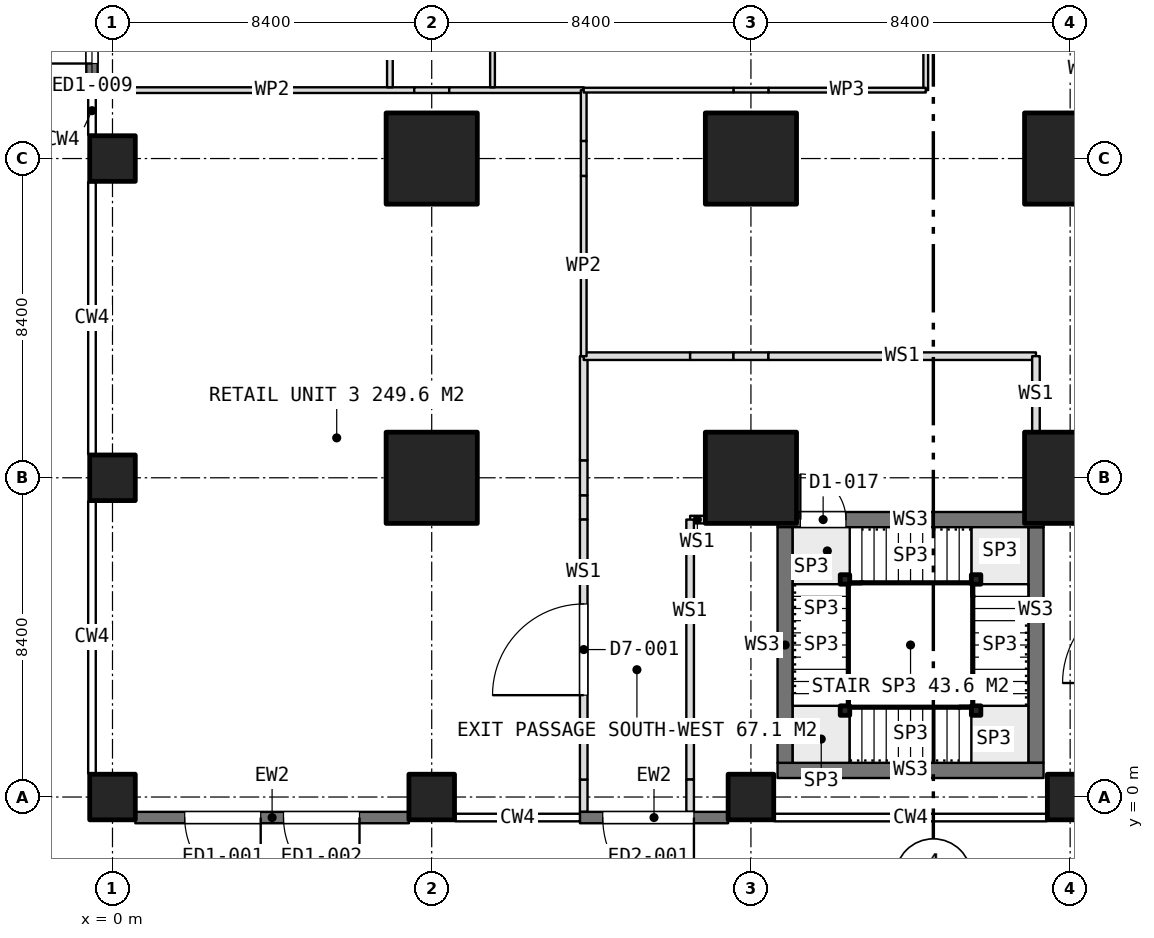
"""IFC4 building model, lengths in metres.
Left out: names, types, materials, properties, quantities, classifications, styles, units other than length and angle.
Written with IfcOpenShell. Run it as: python <this file> out.ifc"""

import sys

from ifc_helpers import new_model, si_unit, direction, frame, frame_2d, origin, origin_2d, place, context, subcontext, project, spatial, rectangle, extrude, element, fill, save


model = new_model("IFC4")
c1 = context("Model", 3, precision=1e-05, world=origin(), true_north=direction((0.0, 1.0)))
c2 = subcontext(c1, "Body", "Model", "MODEL_VIEW")
j1 = project(units=[si_unit("LENGTHUNIT", "METRE"), si_unit("PLANEANGLEUNIT", "RADIAN")], contexts=[c1])
p1 = place(None, origin())
s1 = spatial("IfcSite", under=j1, at=p1, CompositionType="ELEMENT")
p2 = place(p1, origin())
s2 = spatial("IfcBuilding", under=s1, at=p2, CompositionType="ELEMENT")
p3 = place(p2, origin())
s3 = spatial("IfcBuildingStorey", under=s2, at=p3, CompositionType="ELEMENT", Elevation=0.0)
for number, where, z_axis, x_axis in (
    (1, (0.0, 0.0, 0.0), (0.0, 0.0, 1.0), (1.0, 0.0, 0.0)),
    (2, (0.0, 8.4, 0.0), (0.0, 0.0, 1.0), (1.0, 0.0, 0.0)),
    (3, (0.0, 16.8, 0.0), (0.0, 0.0, 1.0), (1.0, 0.0, 0.0)),
    (4, (8.4, 0.0, 0.0), (0.0, 0.0, 1.0), (1.0, 0.0, 0.0)),
):
    element("IfcColumn", number, at=place(p3, frame(where, z_axis=z_axis, x_axis=x_axis)), inside=s3, PredefinedType="COLUMN", context=c2, shape_type="SweptSolid", body=[
        extrude(rectangle(XDim=1.2, YDim=1.2, at=origin_2d()), origin(), (0.0, 0.0, 1.0), 5.4),
    ])
for number, where, z_axis, x_axis in (
    (5, (8.4, 8.4, 0.0), (0.0, 0.0, 1.0), (1.0, 0.0, 0.0)),
    (6, (8.4, 16.8, 0.0), (0.0, 0.0, 1.0), (1.0, 0.0, 0.0)),
):
    element("IfcColumn", number, at=place(p3, frame(where, z_axis=z_axis, x_axis=x_axis)), inside=s3, PredefinedType="COLUMN", context=c2, shape_type="SweptSolid", body=[
        extrude(rectangle(XDim=2.4, YDim=2.4, at=origin_2d()), origin(), (0.0, 0.0, 1.0), 5.4),
    ])
p4 = place(p3, frame((16.8, 0.0, 0.0), z_axis=(0.0, 0.0, 1.0), x_axis=(1.0, 0.0, 0.0)))
e7 = element("IfcColumn", 7, at=p4, inside=s3, PredefinedType="COLUMN", context=c2, shape_type="SweptSolid", body=[
    extrude(rectangle(XDim=1.2, YDim=1.2, at=origin_2d()), origin(), (0.0, 0.0, 1.0), 5.4),
])
for number, where, z_axis, x_axis in (
    (8, (16.8, 8.4, 0.0), (0.0, 0.0, 1.0), (1.0, 0.0, 0.0)),
    (9, (16.8, 16.8, 0.0), (0.0, 0.0, 1.0), (1.0, 0.0, 0.0)),
):
    element("IfcColumn", number, at=place(p3, frame(where, z_axis=z_axis, x_axis=x_axis)), inside=s3, PredefinedType="COLUMN", context=c2, shape_type="SweptSolid", body=[
        extrude(rectangle(XDim=2.4, YDim=2.4, at=origin_2d()), origin(), (0.0, 0.0, 1.0), 5.4),
    ])
p5 = place(p3, frame((25.2, 0.0, 0.0), z_axis=(0.0, 0.0, 1.0), x_axis=(1.0, 0.0, 0.0)))
e10 = element("IfcColumn", 10, at=p5, inside=s3, PredefinedType="COLUMN", context=c2, shape_type="SweptSolid", body=[
    extrude(rectangle(XDim=1.2, YDim=1.2, at=origin_2d()), origin(), (0.0, 0.0, 1.0), 5.4),
])
for number, where, z_axis, x_axis in (
    (11, (25.2, 8.4, 0.0), (0.0, 0.0, 1.0), (1.0, 0.0, 0.0)),
    (12, (25.2, 16.8, 0.0), (0.0, 0.0, 1.0), (1.0, 0.0, 0.0)),
):
    element("IfcColumn", number, at=place(p3, frame(where, z_axis=z_axis, x_axis=x_axis)), inside=s3, PredefinedType="COLUMN", context=c2, shape_type="SweptSolid", body=[
        extrude(rectangle(XDim=2.4, YDim=2.4, at=origin_2d()), origin(), (0.0, 0.0, 1.0), 5.4),
    ])
p6 = place(p3, frame((7.799, -0.54, 0.0), z_axis=(0.0, 0.0, 1.0), x_axis=(-1.0, 0.0, 0.0)))
e13 = element("IfcWall", 13, at=p6, inside=s3, PredefinedType="SOLIDWALL", context=c2, shape_type="SweptSolid", body=[
    extrude(rectangle(XDim=7.198, YDim=0.3, at=frame_2d((3.599, 0.0))), origin(), (0.0, 0.0, 1.0), 3.3),
])
p7 = place(p6, frame((3.899, 0.0, 0.0)))
e14 = element("IfcOpeningElement", 14, at=p7, cuts=e13, PredefinedType="OPENING", context=c2, shape_type="SweptSolid", body=[
    extrude(rectangle(XDim=2.0, YDim=2.7, at=frame_2d((1.0, 1.35))), frame((0.0, 0.16, 0.0), z_axis=(0.0, -1.0, 0.0), x_axis=(1.0, 0.0, 0.0)), (0.0, 0.0, 1.0), 0.32),
])
p8 = place(p6, frame((1.299, 0.0, 0.0)))
e15 = element("IfcOpeningElement", 15, at=p8, cuts=e13, PredefinedType="OPENING", context=c2, shape_type="SweptSolid", body=[
    extrude(rectangle(XDim=2.0, YDim=2.7, at=frame_2d((1.0, 1.35))), frame((0.0, 0.16, 0.0), z_axis=(0.0, -1.0, 0.0), x_axis=(1.0, 0.0, 0.0)), (0.0, 0.0, 1.0), 0.32),
])
p9 = place(p3, frame((16.199, -0.54, 0.0), z_axis=(0.0, 0.0, 1.0), x_axis=(-1.0, 0.0, 0.0)))
e16 = element("IfcWall", 16, at=p9, inside=s3, PredefinedType="SOLIDWALL", context=c2, shape_type="SweptSolid", body=[
    extrude(rectangle(XDim=3.899, YDim=0.3, at=frame_2d((1.949, 0.0))), origin(), (0.0, 0.0, 1.0), 3.3),
])
p10 = place(p9, frame((0.899, 0.0, 0.0)))
e17 = element("IfcOpeningElement", 17, at=p10, cuts=e16, PredefinedType="OPENING", context=c2, shape_type="SweptSolid", body=[
    extrude(rectangle(XDim=2.4, YDim=2.4, at=frame_2d((1.2, 1.2))), frame((0.0, 0.16, 0.0), z_axis=(0.0, -1.0, 0.0), x_axis=(1.0, 0.0, 0.0)), (0.0, 0.0, 1.0), 0.32),
])
p11 = place(p3, frame((-0.54, 18.7, 0.0), z_axis=(0.0, 0.0, 1.0), x_axis=(0.0, 1.0, 0.0)))
e18 = element("IfcWall", 18, at=p11, inside=s3, PredefinedType="SOLIDWALL", context=c2, shape_type="SweptSolid", body=[
    extrude(rectangle(XDim=5.899, YDim=0.3, at=frame_2d((2.95, 0.0))), origin(), (0.0, 0.0, 1.0), 3.3),
])
p12 = place(p11, frame((3.2, 0.0, 0.0)))
e19 = element("IfcOpeningElement", 19, at=p12, cuts=e18, PredefinedType="OPENING", context=c2, shape_type="SweptSolid", body=[
    extrude(rectangle(XDim=2.0, YDim=2.7, at=frame_2d((1.0, 1.35))), frame((0.0, 0.16, 0.0), z_axis=(0.0, -1.0, 0.0), x_axis=(1.0, 0.0, 0.0)), (0.0, 0.0, 1.0), 0.32),
])
p13 = place(p11, frame((0.6, 0.0, 0.0)))
e20 = element("IfcOpeningElement", 20, at=p13, cuts=e18, PredefinedType="OPENING", context=c2, shape_type="SweptSolid", body=[
    extrude(rectangle(XDim=2.0, YDim=2.7, at=frame_2d((1.0, 1.35))), frame((0.0, 0.16, 0.0), z_axis=(0.0, -1.0, 0.0), x_axis=(1.0, 0.0, 0.0)), (0.0, 0.0, 1.0), 0.32),
])
p14 = place(p3, frame((17.5, 0.7, 0.0), z_axis=(0.0, 0.0, 1.0), x_axis=(1.0, 0.0, 0.0)))
e21 = element("IfcWall", 21, at=p14, inside=s3, PredefinedType="SOLIDWALL", context=c2, shape_type="SweptSolid", body=[
    extrude(rectangle(XDim=7.0, YDim=0.4, at=frame_2d((3.5, 0.0))), origin(), (0.0, 0.0, 1.0), 5.1),
])
p15 = place(p3, frame((17.5, 7.3, 0.0), z_axis=(0.0, 0.0, 1.0), x_axis=(1.0, 0.0, 0.0)))
e22 = element("IfcWall", 22, at=p15, inside=s3, PredefinedType="SOLIDWALL", context=c2, shape_type="SweptSolid", body=[
    extrude(rectangle(XDim=7.0, YDim=0.4, at=frame_2d((3.5, 0.0))), origin(), (0.0, 0.0, 1.0), 5.1),
])
p16 = place(p15, frame((0.6, 0.0, 0.0)))
e23 = element("IfcOpeningElement", 23, at=p16, cuts=e22, PredefinedType="OPENING", context=c2, shape_type="SweptSolid", body=[
    extrude(rectangle(XDim=1.2, YDim=2.1, at=frame_2d((0.6, 1.05))), frame((0.0, 0.21, 0.0), z_axis=(0.0, -1.0, 0.0), x_axis=(1.0, 0.0, 0.0)), (0.0, 0.0, 1.0), 0.42),
])
for number, where, z_axis, x_axis in (
    (24, (17.7, 0.9, 0.0), (0.0, 0.0, 1.0), (0.0, 1.0, 0.0)),
    (25, (24.3, 0.9, 0.0), (0.0, 0.0, 1.0), (0.0, 1.0, 0.0)),
):
    element("IfcWall", number, at=place(p3, frame(where, z_axis=z_axis, x_axis=x_axis)), inside=s3, PredefinedType="SOLIDWALL", context=c2, shape_type="SweptSolid", body=[
        extrude(rectangle(XDim=6.2, YDim=0.4, at=frame_2d((3.1, 0.0))), origin(), (0.0, 0.0, 1.0), 5.1),
    ])
p17 = place(p3, frame((12.4, 7.3, 0.0), z_axis=(0.0, 0.0, 1.0), x_axis=(0.0, 1.0, 0.0)))
e26 = element("IfcWall", 26, at=p17, inside=s3, PredefinedType="PARTITIONING", context=c2, shape_type="SweptSolid", body=[
    extrude(rectangle(XDim=0.64, YDim=0.2, at=frame_2d((0.32, 0.0))), origin(), (0.0, 0.0, 1.0), 5.1),
])
p18 = place(p3, frame((12.4, 7.94, 0.0), z_axis=(0.0, 0.0, 1.0), x_axis=(0.0, 1.0, 0.0)))
e27 = element("IfcWall", 27, at=p18, inside=s3, PredefinedType="PARTITIONING", context=c2, shape_type="SweptSolid", body=[
    extrude(rectangle(XDim=0.92, YDim=0.2, at=frame_2d((0.46, 0.0))), origin(), (0.0, 0.0, 1.0), 3.3),
])
p19 = place(p3, frame((12.4, 8.86, 0.0), z_axis=(0.0, 0.0, 1.0), x_axis=(0.0, 1.0, 0.0)))
e28 = element("IfcWall", 28, at=p19, inside=s3, PredefinedType="PARTITIONING", context=c2, shape_type="SweptSolid", body=[
    extrude(rectangle(XDim=2.74, YDim=0.2, at=frame_2d((1.37, 0.0))), origin(), (0.0, 0.0, 1.0), 5.1),
])
p20 = place(p3, frame((12.4, 11.6, 0.0), z_axis=(0.0, 0.0, 1.0), x_axis=(1.0, 0.0, 0.0)))
e29 = element("IfcWall", 29, at=p20, inside=s3, PredefinedType="PARTITIONING", context=c2, shape_type="SweptSolid", body=[
    extrude(rectangle(XDim=2.8, YDim=0.2, at=frame_2d((1.4, 0.0))), origin(), (0.0, 0.0, 1.0), 5.1),
])
p21 = place(p3, frame((15.2, 11.6, 0.0), z_axis=(0.0, 0.0, 1.0), x_axis=(1.0, 0.0, 0.0)))
e30 = element("IfcWall", 30, at=p21, inside=s3, PredefinedType="PARTITIONING", context=c2, shape_type="SweptSolid", body=[
    extrude(rectangle(XDim=1.14, YDim=0.2, at=frame_2d((0.57, 0.0))), origin(), (0.0, 0.0, 1.0), 5.1),
])
p22 = place(p3, frame((16.34, 11.6, 0.0), z_axis=(0.0, 0.0, 1.0), x_axis=(1.0, 0.0, 0.0)))
e31 = element("IfcWall", 31, at=p22, inside=s3, PredefinedType="PARTITIONING", context=c2, shape_type="SweptSolid", body=[
    extrude(rectangle(XDim=0.92, YDim=0.2, at=frame_2d((0.46, 0.0))), origin(), (0.0, 0.0, 1.0), 3.3),
])
p23 = place(p3, frame((17.26, 11.6, 0.0), z_axis=(0.0, 0.0, 1.0), x_axis=(1.0, 0.0, 0.0)))
e32 = element("IfcWall", 32, at=p23, inside=s3, PredefinedType="PARTITIONING", context=c2, shape_type="SweptSolid", body=[
    extrude(rectangle(XDim=7.04, YDim=0.2, at=frame_2d((3.52, 0.0))), origin(), (0.0, 0.0, 1.0), 5.1),
])
p24 = place(p3, frame((24.3, 11.6, 0.0), z_axis=(0.0, 0.0, 1.0), x_axis=(0.0, -1.0, 0.0)))
e33 = element("IfcWall", 33, at=p24, inside=s3, PredefinedType="PARTITIONING", context=c2, shape_type="SweptSolid", body=[
    extrude(rectangle(XDim=1.98, YDim=0.2, at=frame_2d((0.99, 0.0))), origin(), (0.0, 0.0, 1.0), 5.1),
])
p25 = place(p3, frame((15.58, 7.3, 0.0), z_axis=(0.0, 0.0, 1.0), x_axis=(-1.0, 0.0, 0.0)))
e34 = element("IfcWall", 34, at=p25, inside=s3, PredefinedType="PARTITIONING", context=c2, shape_type="SweptSolid", body=[
    extrude(rectangle(XDim=0.38, YDim=0.2, at=frame_2d((0.19, 0.0))), origin(), (0.0, 0.0, 1.0), 5.1),
])
p26 = place(p3, frame((15.2, 7.3, 0.0), z_axis=(0.0, 0.0, 1.0), x_axis=(0.0, -1.0, 0.0)))
e35 = element("IfcWall", 35, at=p26, inside=s3, PredefinedType="PARTITIONING", context=c2, shape_type="SweptSolid", body=[
    extrude(rectangle(XDim=6.84, YDim=0.2, at=frame_2d((3.42, 0.0))), origin(), (0.0, 0.0, 1.0), 5.1),
])
for number, where, z_axis, x_axis in (
    (36, (15.2, 0.46, 0.0), (0.0, 0.0, 1.0), (0.0, -1.0, 0.0)),
    (37, (12.4, -0.39, 0.0), (0.0, 0.0, 1.0), (0.0, 1.0, 0.0)),
):
    element("IfcWall", number, at=place(p3, frame(where, z_axis=z_axis, x_axis=x_axis)), inside=s3, PredefinedType="PARTITIONING", context=c2, shape_type="SweptSolid", body=[
        extrude(rectangle(XDim=0.85, YDim=0.2, at=frame_2d((0.425, 0.0))), origin(), (0.0, 0.0, 1.0), 3.3),
    ])
p27 = place(p3, frame((12.4, 0.46, 0.0), z_axis=(0.0, 0.0, 1.0), x_axis=(0.0, 1.0, 0.0)))
e38 = element("IfcWall", 38, at=p27, inside=s3, PredefinedType="PARTITIONING", context=c2, shape_type="SweptSolid", body=[
    extrude(rectangle(XDim=6.84, YDim=0.2, at=frame_2d((3.42, 0.0))), origin(), (0.0, 0.0, 1.0), 5.1),
])
p28 = place(p27, frame((2.22, 0.0, 0.0)))
e39 = element("IfcOpeningElement", 39, at=p28, cuts=e38, PredefinedType="OPENING", context=c2, shape_type="SweptSolid", body=[
    extrude(rectangle(XDim=2.4, YDim=2.4, at=frame_2d((1.2, 1.2))), frame((0.0, 0.11, 0.0), z_axis=(0.0, -1.0, 0.0), x_axis=(1.0, 0.0, 0.0)), (0.0, 0.0, 1.0), 0.22),
])
p29 = place(p3, frame((-0.45, 18.6, 0.0), z_axis=(0.0, 0.0, 1.0), x_axis=(1.0, 0.0, 0.0)))
e40 = element("IfcWall", 40, at=p29, inside=s3, PredefinedType="PARTITIONING", context=c2, shape_type="SweptSolid", body=[
    extrude(rectangle(XDim=0.91, YDim=0.15, at=frame_2d((0.455, 0.0))), origin(), (0.0, 0.0, 1.0), 3.3),
])
p30 = place(p3, frame((0.46, 18.6, 0.0), z_axis=(0.0, 0.0, 1.0), x_axis=(1.0, 0.0, 0.0)))
e41 = element("IfcWall", 41, at=p30, inside=s3, PredefinedType="PARTITIONING", context=c2, shape_type="SweptSolid", body=[
    extrude(rectangle(XDim=7.48, YDim=0.15, at=frame_2d((3.74, 0.0))), origin(), (0.0, 0.0, 1.0), 5.1),
])
p31 = place(p3, frame((7.94, 18.6, 0.0), z_axis=(0.0, 0.0, 1.0), x_axis=(1.0, 0.0, 0.0)))
e42 = element("IfcWall", 42, at=p31, inside=s3, PredefinedType="PARTITIONING", context=c2, shape_type="SweptSolid", body=[
    extrude(rectangle(XDim=0.92, YDim=0.15, at=frame_2d((0.46, 0.0))), origin(), (0.0, 0.0, 1.0), 3.3),
])
p32 = place(p3, frame((8.86, 18.6, 0.0), z_axis=(0.0, 0.0, 1.0), x_axis=(1.0, 0.0, 0.0)))
e43 = element("IfcWall", 43, at=p32, inside=s3, PredefinedType="PARTITIONING", context=c2, shape_type="SweptSolid", body=[
    extrude(rectangle(XDim=3.54, YDim=0.15, at=frame_2d((1.77, 0.0))), origin(), (0.0, 0.0, 1.0), 5.1),
])
p33 = place(p3, frame((12.4, 18.6, 0.0), z_axis=(0.0, 0.0, 1.0), x_axis=(0.0, -1.0, 0.0)))
e44 = element("IfcWall", 44, at=p33, inside=s3, PredefinedType="PARTITIONING", context=c2, shape_type="SweptSolid", body=[
    extrude(rectangle(XDim=1.34, YDim=0.15, at=frame_2d((0.67, 0.0))), origin(), (0.0, 0.0, 1.0), 5.1),
])
p34 = place(p3, frame((12.4, 17.26, 0.0), z_axis=(0.0, 0.0, 1.0), x_axis=(0.0, -1.0, 0.0)))
e45 = element("IfcWall", 45, at=p34, inside=s3, PredefinedType="PARTITIONING", context=c2, shape_type="SweptSolid", body=[
    extrude(rectangle(XDim=0.92, YDim=0.15, at=frame_2d((0.46, 0.0))), origin(), (0.0, 0.0, 1.0), 3.3),
])
p35 = place(p3, frame((12.4, 16.34, 0.0), z_axis=(0.0, 0.0, 1.0), x_axis=(0.0, -1.0, 0.0)))
e46 = element("IfcWall", 46, at=p35, inside=s3, PredefinedType="PARTITIONING", context=c2, shape_type="SweptSolid", body=[
    extrude(rectangle(XDim=4.74, YDim=0.15, at=frame_2d((2.37, 0.0))), origin(), (0.0, 0.0, 1.0), 5.1),
])
p36 = place(p3, frame((21.4, 25.0, 0.0), z_axis=(0.0, 0.0, 1.0), x_axis=(0.0, -1.0, 0.0)))
e47 = element("IfcWall", 47, at=p36, inside=s3, PredefinedType="PARTITIONING", context=c2, shape_type="SweptSolid", body=[
    extrude(rectangle(XDim=6.4, YDim=0.125, at=frame_2d((3.2, 0.0))), origin(), (0.0, 0.0, 1.0), 5.1),
])
p37 = place(p36, frame((2.7, 0.0, 0.0)))
e48 = element("IfcOpeningElement", 48, at=p37, cuts=e47, PredefinedType="OPENING", context=c2, shape_type="SweptSolid", body=[
    extrude(rectangle(XDim=1.0, YDim=2.1, at=frame_2d((0.5, 1.05))), frame((0.0, 0.073, 0.0), z_axis=(0.0, -1.0, 0.0), x_axis=(1.0, 0.0, 0.0)), (0.0, 0.0, 1.0), 0.145),
])
p38 = place(p3, frame((21.4, 18.6, 0.0), z_axis=(0.0, 0.0, 1.0), x_axis=(-1.0, 0.0, 0.0)))
e49 = element("IfcWall", 49, at=p38, inside=s3, PredefinedType="PARTITIONING", context=c2, shape_type="SweptSolid", body=[
    extrude(rectangle(XDim=4.14, YDim=0.125, at=frame_2d((2.07, 0.0))), origin(), (0.0, 0.0, 1.0), 5.1),
])
p39 = place(p3, frame((17.26, 18.6, 0.0), z_axis=(0.0, 0.0, 1.0), x_axis=(-1.0, 0.0, 0.0)))
e50 = element("IfcWall", 50, at=p39, inside=s3, PredefinedType="PARTITIONING", context=c2, shape_type="SweptSolid", body=[
    extrude(rectangle(XDim=0.92, YDim=0.125, at=frame_2d((0.46, 0.0))), origin(), (0.0, 0.0, 1.0), 3.3),
])
p40 = place(p3, frame((16.34, 18.6, 0.0), z_axis=(0.0, 0.0, 1.0), x_axis=(-1.0, 0.0, 0.0)))
e51 = element("IfcWall", 51, at=p40, inside=s3, PredefinedType="PARTITIONING", context=c2, shape_type="SweptSolid", body=[
    extrude(rectangle(XDim=3.94, YDim=0.125, at=frame_2d((1.97, 0.0))), origin(), (0.0, 0.0, 1.0), 5.1),
])
p41 = place(p3, frame((10.0, 18.675, 0.0), z_axis=(0.0, 0.0, 1.0), x_axis=(0.0, 1.0, 0.0)))
e52 = element("IfcWall", 52, at=p41, inside=s3, PredefinedType="PARTITIONING", context=c2, shape_type="SweptSolid", body=[
    extrude(rectangle(XDim=6.325, YDim=0.125, at=frame_2d((3.163, 0.0))), origin(), (0.0, 0.0, 1.0), 3.3),
])
p42 = place(p3, frame((7.3, 23.98, 0.0), z_axis=(0.0, 0.0, 1.0), x_axis=(0.0, -1.0, 0.0)))
e53 = element("IfcWall", 53, at=p42, inside=s3, PredefinedType="PARTITIONING", context=c2, shape_type="SweptSolid", body=[
    extrude(rectangle(XDim=5.305, YDim=0.15, at=frame_2d((2.652, 0.0))), origin(), (0.0, 0.0, 1.0), 5.1),
])
p43 = place(p42, frame((1.825, 0.0, 0.0)))
e54 = element("IfcOpeningElement", 54, at=p43, cuts=e53, PredefinedType="OPENING", context=c2, shape_type="SweptSolid", body=[
    extrude(rectangle(XDim=1.8, YDim=2.1, at=frame_2d((0.9, 1.05))), frame((0.0, 0.085, 0.0), z_axis=(0.0, -1.0, 0.0), x_axis=(1.0, 0.0, 0.0)), (0.0, 0.0, 1.0), 0.17),
])
for number, where, z_axis, x_axis in (
    (55, (19.275, 5.725, 0.0), (0.0, 0.0, 1.0), (1.0, 0.0, 0.0)),
    (56, (19.275, 2.275, 0.0), (0.0, 0.0, 1.0), (1.0, 0.0, 0.0)),
    (57, (22.725, 2.275, 0.0), (0.0, 0.0, 1.0), (1.0, 0.0, 0.0)),
    (58, (22.725, 5.725, 0.0), (0.0, 0.0, 1.0), (1.0, 0.0, 0.0)),
):
    element("IfcColumn", number, at=place(p3, frame(where, z_axis=z_axis, x_axis=x_axis)), inside=s3, PredefinedType="COLUMN", context=c2, shape_type="SweptSolid", body=[
        extrude(rectangle(XDim=0.25, YDim=0.25, at=origin_2d()), origin(), (0.0, 0.0, 1.0), 5.4),
    ])
p44 = place(p7, origin())
e59 = element("IfcDoor", 59, at=p44, inside=s3, OperationType="DOUBLE_DOOR_SINGLE_SWING", PredefinedType="DOOR", context=c2, shape_type="SweptSolid", body=[
    extrude(rectangle(XDim=2.0, YDim=2.7, at=frame_2d((1.0, 1.35))), frame((0.0, 0.025, 0.0), z_axis=(0.0, -1.0, 0.0), x_axis=(1.0, 0.0, 0.0)), (0.0, 0.0, 1.0), 0.05),
])
fill(e14, e59)
p45 = place(p8, origin())
e60 = element("IfcDoor", 60, at=p45, inside=s3, OperationType="DOUBLE_DOOR_SINGLE_SWING", PredefinedType="DOOR", context=c2, shape_type="SweptSolid", body=[
    extrude(rectangle(XDim=2.0, YDim=2.7, at=frame_2d((1.0, 1.35))), frame((0.0, 0.025, 0.0), z_axis=(0.0, -1.0, 0.0), x_axis=(1.0, 0.0, 0.0)), (0.0, 0.0, 1.0), 0.05),
])
fill(e15, e60)
p46 = place(p10, origin())
e61 = element("IfcDoor", 61, at=p46, inside=s3, OperationType="DOUBLE_DOOR_SINGLE_SWING", PredefinedType="DOOR", context=c2, shape_type="SweptSolid", body=[
    extrude(rectangle(XDim=2.4, YDim=2.4, at=frame_2d((1.2, 1.2))), frame((0.0, 0.025, 0.0), z_axis=(0.0, -1.0, 0.0), x_axis=(1.0, 0.0, 0.0)), (0.0, 0.0, 1.0), 0.05),
])
fill(e17, e61)
p47 = place(p13, origin())
e62 = element("IfcDoor", 62, at=p47, inside=s3, OperationType="DOUBLE_DOOR_SINGLE_SWING", PredefinedType="DOOR", context=c2, shape_type="SweptSolid", body=[
    extrude(rectangle(XDim=2.0, YDim=2.7, at=frame_2d((1.0, 1.35))), frame((0.0, 0.025, 0.0), z_axis=(0.0, -1.0, 0.0), x_axis=(1.0, 0.0, 0.0)), (0.0, 0.0, 1.0), 0.05),
])
fill(e20, e62)
p48 = place(p28, origin())
e63 = element("IfcDoor", 63, at=p48, inside=s3, OperationType="DOUBLE_DOOR_SINGLE_SWING", PredefinedType="DOOR", context=c2, shape_type="SweptSolid", body=[
    extrude(rectangle(XDim=2.4, YDim=2.4, at=frame_2d((1.2, 1.2))), frame((0.0, 0.025, 0.0), z_axis=(0.0, -1.0, 0.0), x_axis=(1.0, 0.0, 0.0)), (0.0, 0.0, 1.0), 0.05),
])
fill(e39, e63)
p49 = place(p16, origin())
e64 = element("IfcDoor", 64, at=p49, inside=s3, OperationType="SINGLE_SWING_RIGHT", PredefinedType="DOOR", context=c2, shape_type="SweptSolid", body=[
    extrude(rectangle(XDim=1.2, YDim=2.1, at=frame_2d((0.6, 1.05))), frame((0.0, 0.025, 0.0), z_axis=(0.0, -1.0, 0.0), x_axis=(1.0, 0.0, 0.0)), (0.0, 0.0, 1.0), 0.05),
])
fill(e23, e64)
save(model, sys.argv[1])
